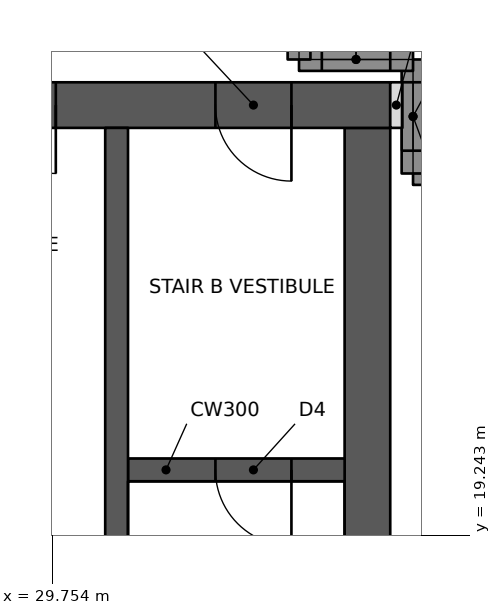
"""IFC4 building model, lengths in metres.
Left out: names, types, materials, properties, quantities, classifications, styles, units other than length and angle.
Written with IfcOpenShell. Run it as: python <this file> out.ifc"""

import sys

from ifc_helpers import new_model, si_unit, direction, frame, frame_2d, origin, place, context, subcontext, project, spatial, rectangle, extrude, element, fill, save


model = new_model("IFC4")
c1 = context("Model", 3, precision=1e-05, world=origin(), true_north=direction((0.0, 1.0)))
c2 = subcontext(c1, "Body", "Model", "MODEL_VIEW")
j1 = project(units=[si_unit("LENGTHUNIT", "METRE"), si_unit("PLANEANGLEUNIT", "RADIAN")], contexts=[c1])
p1 = place(None, origin())
s1 = spatial("IfcSite", under=j1, at=p1, CompositionType="ELEMENT")
p2 = place(p1, origin())
s2 = spatial("IfcBuilding", under=s1, at=p2, CompositionType="ELEMENT")
p3 = place(p2, frame((0.0, 0.0, 259.0)))
s3 = spatial("IfcBuildingStorey", under=s2, at=p3, CompositionType="ELEMENT", Elevation=259.0)
p4 = place(p3, frame((10.8, 24.9, 0.0), z_axis=(0.0, 0.0, 1.0), x_axis=(1.0, 0.0, 0.0)))
e1 = element("IfcWall", 1, at=p4, inside=s3, PredefinedType="SHEAR", context=c2, shape_type="SweptSolid", body=[
    extrude(rectangle(XDim=23.4, YDim=0.6, at=frame_2d((11.7, 0.0))), origin(), (0.0, 0.0, 1.0), 3.6),
])
p5 = place(p4, frame((17.2, 0.0, 0.0)))
e2 = element("IfcOpeningElement", 2, at=p5, cuts=e1, PredefinedType="OPENING", context=c2, shape_type="SweptSolid", body=[
    extrude(rectangle(XDim=1.8, YDim=2.1, at=frame_2d((0.9, 1.05))), frame((0.0, 0.31, 0.0), z_axis=(0.0, -1.0, 0.0), x_axis=(1.0, 0.0, 0.0)), (0.0, 0.0, 1.0), 0.62),
])
p6 = place(p4, frame((21.1, 0.0, 0.0)))
e3 = element("IfcOpeningElement", 3, at=p6, cuts=e1, PredefinedType="OPENING", context=c2, shape_type="SweptSolid", body=[
    extrude(rectangle(XDim=1.0, YDim=2.1, at=frame_2d((0.5, 1.05))), frame((0.0, 0.31, 0.0), z_axis=(0.0, -1.0, 0.0), x_axis=(1.0, 0.0, 0.0)), (0.0, 0.0, 1.0), 0.62),
])
p7 = place(p4, frame((4.9, 0.0, 0.0)))
e4 = element("IfcOpeningElement", 4, at=p7, cuts=e1, PredefinedType="OPENING", context=c2, shape_type="SweptSolid", body=[
    extrude(rectangle(XDim=1.0, YDim=2.1, at=frame_2d((0.5, 1.05))), frame((0.0, 0.31, 0.0), z_axis=(0.0, -1.0, 0.0), x_axis=(1.0, 0.0, 0.0)), (0.0, 0.0, 1.0), 0.62),
])
p8 = place(p3, frame((33.9, 11.4, 0.0), z_axis=(0.0, 0.0, 1.0), x_axis=(0.0, 1.0, 0.0)))
e5 = element("IfcWall", 5, at=p8, inside=s3, PredefinedType="SHEAR", context=c2, shape_type="SweptSolid", body=[
    extrude(rectangle(XDim=13.2, YDim=0.6, at=frame_2d((6.6, 0.0))), origin(), (0.0, 0.0, 1.0), 3.6),
])
p9 = place(p3, frame((30.6, 11.4, 0.0), z_axis=(0.0, 0.0, 1.0), x_axis=(0.0, 1.0, 0.0)))
e6 = element("IfcWall", 6, at=p9, inside=s3, PredefinedType="SHEAR", context=c2, shape_type="SweptSolid", body=[
    extrude(rectangle(XDim=13.2, YDim=0.3, at=frame_2d((6.6, 0.0))), origin(), (0.0, 0.0, 1.0), 3.6),
])
p10 = place(p3, frame((30.75, 20.1, 0.0), z_axis=(0.0, 0.0, 1.0), x_axis=(1.0, 0.0, 0.0)))
e7 = element("IfcWall", 7, at=p10, inside=s3, PredefinedType="SHEAR", context=c2, shape_type="SweptSolid", body=[
    extrude(rectangle(XDim=2.85, YDim=0.3, at=frame_2d((1.425, 0.0))), origin(), (0.0, 0.0, 1.0), 3.6),
])
p11 = place(p10, frame((1.15, 0.0, 0.0)))
e8 = element("IfcOpeningElement", 8, at=p11, cuts=e7, PredefinedType="OPENING", context=c2, shape_type="SweptSolid", body=[
    extrude(rectangle(XDim=1.0, YDim=2.1, at=frame_2d((0.5, 1.05))), frame((0.0, 0.16, 0.0), z_axis=(0.0, -1.0, 0.0), x_axis=(1.0, 0.0, 0.0)), (0.0, 0.0, 1.0), 0.32),
])
p12 = place(p3, frame((36.0, 24.0, 0.0), z_axis=(0.0, 0.0, 1.0), x_axis=(-1.0, 0.0, 0.0)))
e9 = element("IfcWall", 9, at=p12, inside=s3, PredefinedType="SOLIDWALL", context=c2, shape_type="SweptSolid", body=[
    extrude(rectangle(XDim=1.5, YDim=0.3, at=frame_2d((0.75, 0.0))), origin(), (0.0, 0.0, 1.0), 2.62),
])
p13 = place(p3, frame((34.5, 24.0, 0.0), z_axis=(0.0, 0.0, 1.0), x_axis=(0.0, 1.0, 0.0)))
e10 = element("IfcWall", 10, at=p13, inside=s3, PredefinedType="SOLIDWALL", context=c2, shape_type="SweptSolid", body=[
    extrude(rectangle(XDim=1.5, YDim=0.3, at=frame_2d((0.75, 0.0))), origin(), (0.0, 0.0, 1.0), 3.4),
])
p14 = place(p13, frame((0.3, 0.0, 0.6)))
e11 = element("IfcOpeningElement", 11, at=p14, cuts=e10, PredefinedType="OPENING", context=c2, shape_type="SweptSolid", body=[
    extrude(rectangle(XDim=0.9, YDim=2.2, at=frame_2d((0.45, 1.1))), frame((0.0, 0.16, 0.0), z_axis=(0.0, -1.0, 0.0), x_axis=(1.0, 0.0, 0.0)), (0.0, 0.0, 1.0), 0.32),
])
p15 = place(p3, frame((34.5, 25.5, 0.0), z_axis=(0.0, 0.0, 1.0), x_axis=(-1.0, 0.0, 0.0)))
e12 = element("IfcWall", 12, at=p15, inside=s3, PredefinedType="SOLIDWALL", context=c2, shape_type="SweptSolid", body=[
    extrude(rectangle(XDim=1.5, YDim=0.3, at=frame_2d((0.75, 0.0))), origin(), (0.0, 0.0, 1.0), 3.4),
])
p16 = place(p15, frame((0.3, 0.0, 0.6)))
e13 = element("IfcOpeningElement", 13, at=p16, cuts=e12, PredefinedType="OPENING", context=c2, shape_type="SweptSolid", body=[
    extrude(rectangle(XDim=0.9, YDim=2.2, at=frame_2d((0.45, 1.1))), frame((0.0, 0.16, 0.0), z_axis=(0.0, -1.0, 0.0), x_axis=(1.0, 0.0, 0.0)), (0.0, 0.0, 1.0), 0.32),
])
p17 = place(p3, frame((33.0, 25.5, 0.0), z_axis=(0.0, 0.0, 1.0), x_axis=(0.0, 1.0, 0.0)))
e14 = element("IfcWall", 14, at=p17, inside=s3, PredefinedType="SOLIDWALL", context=c2, shape_type="SweptSolid", body=[
    extrude(rectangle(XDim=1.5, YDim=0.3, at=frame_2d((0.75, 0.0))), origin(), (0.0, 0.0, 1.0), 2.62),
])
p18 = place(p3, frame((34.2, 24.9, 0.0), z_axis=(0.0, 0.0, 1.0), x_axis=(1.0, 0.0, 0.0)))
e15 = element("IfcWall", 15, at=p18, inside=s3, PredefinedType="PARTITIONING", context=c2, shape_type="SweptSolid", body=[
    extrude(rectangle(XDim=0.16, YDim=0.6, at=frame_2d((0.08, 0.0))), origin(), (0.0, 0.0, 1.0), 3.4),
])
p19 = place(p14, origin())
e16 = element("IfcWindow", 16, at=p19, inside=s3, PartitioningType="SINGLE_PANEL", PredefinedType="WINDOW", context=c2, shape_type="SweptSolid", body=[
    extrude(rectangle(XDim=0.9, YDim=2.2, at=frame_2d((0.45, 1.1))), frame((0.0, 0.03, 0.0), z_axis=(0.0, -1.0, 0.0), x_axis=(1.0, 0.0, 0.0)), (0.0, 0.0, 1.0), 0.06),
])
fill(e11, e16)
p20 = place(p16, origin())
e17 = element("IfcWindow", 17, at=p20, inside=s3, PartitioningType="SINGLE_PANEL", PredefinedType="WINDOW", context=c2, shape_type="SweptSolid", body=[
    extrude(rectangle(XDim=0.9, YDim=2.2, at=frame_2d((0.45, 1.1))), frame((0.0, 0.03, 0.0), z_axis=(0.0, -1.0, 0.0), x_axis=(1.0, 0.0, 0.0)), (0.0, 0.0, 1.0), 0.06),
])
fill(e13, e17)
p21 = place(p5, frame((1.8, 0.0, 0.0), z_axis=(0.0, 0.0, 1.0), x_axis=(-1.0, 0.0, 0.0)))
e18 = element("IfcDoor", 18, at=p21, inside=s3, OperationType="DOUBLE_DOOR_SINGLE_SWING", PredefinedType="DOOR", context=c2, shape_type="SweptSolid", body=[
    extrude(rectangle(XDim=1.8, YDim=2.1, at=frame_2d((0.9, 1.05))), frame((0.0, 0.025, 0.0), z_axis=(0.0, -1.0, 0.0), x_axis=(1.0, 0.0, 0.0)), (0.0, 0.0, 1.0), 0.05),
])
fill(e2, e18)
p22 = place(p6, frame((1.0, 0.0, 0.0), z_axis=(0.0, 0.0, 1.0), x_axis=(-1.0, 0.0, 0.0)))
e19 = element("IfcDoor", 19, at=p22, inside=s3, OperationType="SINGLE_SWING_LEFT", PredefinedType="DOOR", context=c2, shape_type="SweptSolid", body=[
    extrude(rectangle(XDim=1.0, YDim=2.1, at=frame_2d((0.5, 1.05))), frame((0.0, 0.025, 0.0), z_axis=(0.0, -1.0, 0.0), x_axis=(1.0, 0.0, 0.0)), (0.0, 0.0, 1.0), 0.05),
])
fill(e3, e19)
p23 = place(p11, frame((1.0, 0.0, 0.0), z_axis=(0.0, 0.0, 1.0), x_axis=(-1.0, 0.0, 0.0)))
e20 = element("IfcDoor", 20, at=p23, inside=s3, OperationType="SINGLE_SWING_LEFT", PredefinedType="DOOR", context=c2, shape_type="SweptSolid", body=[
    extrude(rectangle(XDim=1.0, YDim=2.1, at=frame_2d((0.5, 1.05))), frame((0.0, 0.025, 0.0), z_axis=(0.0, -1.0, 0.0), x_axis=(1.0, 0.0, 0.0)), (0.0, 0.0, 1.0), 0.05),
])
fill(e8, e20)
save(model, sys.argv[1])
